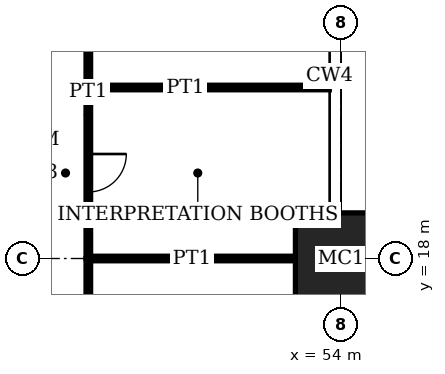
"""IFC4 building model, lengths in metres.
Left out: names, types, materials, properties, quantities, classifications, styles, units other than length and angle.
Written with IfcOpenShell. Run it as: python <this file> out.ifc"""

import sys

from ifc_helpers import new_model, si_unit, direction, frame, frame_2d, origin, origin_2d, place, context, subcontext, project, spatial, rectangle, extrude, element, fill, save


model = new_model("IFC4")
c1 = context("Model", 3, precision=1e-05, world=origin(), true_north=direction((0.0, 1.0)))
c2 = subcontext(c1, "Body", "Model", "MODEL_VIEW")
j1 = project(units=[si_unit("LENGTHUNIT", "METRE"), si_unit("PLANEANGLEUNIT", "RADIAN")], contexts=[c1])
p1 = place(None, origin())
s1 = spatial("IfcSite", under=j1, at=p1, CompositionType="ELEMENT")
p2 = place(p1, origin())
s2 = spatial("IfcBuilding", under=s1, at=p2, CompositionType="ELEMENT")
p3 = place(p2, frame((0.0, 0.0, 178.2)))
s3 = spatial("IfcBuildingStorey", under=s2, at=p3, CompositionType="ELEMENT", Elevation=178.2)
p4 = place(p3, frame((54.0, 18.0, 0.0), z_axis=(0.0, 0.0, 1.0), x_axis=(1.0, 0.0, 0.0)))
e1 = element("IfcColumn", 1, at=p4, inside=s3, PredefinedType="COLUMN", context=c2, shape_type="SweptSolid", body=[
    extrude(rectangle(XDim=2.4, YDim=2.4, at=origin_2d()), origin(), (0.0, 0.0, 1.0), 4.0),
])
p5 = place(p3, frame((47.35, 18.0, 0.0), z_axis=(0.0, 0.0, 1.0), x_axis=(1.0, 0.0, 0.0)))
e2 = element("IfcWall", 2, at=p5, inside=s3, PredefinedType="PARTITIONING", context=c2, shape_type="SweptSolid", body=[
    extrude(rectangle(XDim=5.45, YDim=0.12, at=frame_2d((2.725, 0.0))), origin(), (0.0, 0.0, 1.0), 3.05),
])
p6 = place(p3, frame((47.35, 22.5, 0.0), z_axis=(0.0, 0.0, 1.0), x_axis=(1.0, 0.0, 0.0)))
e3 = element("IfcWall", 3, at=p6, inside=s3, PredefinedType="PARTITIONING", context=c2, shape_type="SweptSolid", body=[
    extrude(rectangle(XDim=6.34, YDim=0.12, at=frame_2d((3.17, 0.0))), origin(), (0.0, 0.0, 1.0), 3.1),
])
p7 = place(p3, frame((47.35, 9.0, 0.0), z_axis=(0.0, 0.0, 1.0), x_axis=(0.0, 1.0, 0.0)))
e4 = element("IfcWall", 4, at=p7, inside=s3, PredefinedType="PARTITIONING", context=c2, shape_type="SweptSolid", body=[
    extrude(rectangle(XDim=9.0, YDim=0.12, at=frame_2d((4.5, 0.0))), origin(), (0.0, 0.0, 1.0), 3.75),
])
p8 = place(p7, frame((4.0, 0.0, 0.0)))
e5 = element("IfcOpeningElement", 5, at=p8, cuts=e4, PredefinedType="OPENING", context=c2, shape_type="SweptSolid", body=[
    extrude(rectangle(XDim=1.0, YDim=2.4, at=frame_2d((0.5, 1.2))), frame((0.0, 0.07, 0.0), z_axis=(0.0, -1.0, 0.0), x_axis=(1.0, 0.0, 0.0)), (0.0, 0.0, 1.0), 0.14),
])
p9 = place(p3, frame((47.35, 18.0, 0.0), z_axis=(0.0, 0.0, 1.0), x_axis=(0.0, 1.0, 0.0)))
e6 = element("IfcWall", 6, at=p9, inside=s3, PredefinedType="PARTITIONING", context=c2, shape_type="SweptSolid", body=[
    extrude(rectangle(XDim=4.5, YDim=0.12, at=frame_2d((2.25, 0.0))), origin(), (0.0, 0.0, 1.0), 3.75),
])
p10 = place(p9, frame((1.75, 0.0, 0.0)))
e7 = element("IfcOpeningElement", 7, at=p10, cuts=e6, PredefinedType="OPENING", context=c2, shape_type="SweptSolid", body=[
    extrude(rectangle(XDim=1.0, YDim=2.4, at=frame_2d((0.5, 1.2))), frame((0.0, 0.07, 0.0), z_axis=(0.0, -1.0, 0.0), x_axis=(1.0, 0.0, 0.0)), (0.0, 0.0, 1.0), 0.14),
])
p11 = place(p3, frame((47.35, 22.5, 0.0), z_axis=(0.0, 0.0, 1.0), x_axis=(0.0, 1.0, 0.0)))
e8 = element("IfcWall", 8, at=p11, inside=s3, PredefinedType="PARTITIONING", context=c2, shape_type="SweptSolid", body=[
    extrude(rectangle(XDim=9.0, YDim=0.12, at=frame_2d((4.5, 0.0))), origin(), (0.0, 0.0, 1.0), 3.75),
])
p12 = place(p11, frame((4.0, 0.0, 0.0)))
e9 = element("IfcOpeningElement", 9, at=p12, cuts=e8, PredefinedType="OPENING", context=c2, shape_type="SweptSolid", body=[
    extrude(rectangle(XDim=1.0, YDim=2.4, at=frame_2d((0.5, 1.2))), frame((0.0, 0.07, 0.0), z_axis=(0.0, -1.0, 0.0), x_axis=(1.0, 0.0, 0.0)), (0.0, 0.0, 1.0), 0.14),
])
p13 = place(p10, origin())
e10 = element("IfcDoor", 10, at=p13, inside=s3, OperationType="SINGLE_SWING_RIGHT", PredefinedType="DOOR", context=c2, shape_type="SweptSolid", body=[
    extrude(rectangle(XDim=1.0, YDim=2.4, at=frame_2d((0.5, 1.2))), frame((0.0, 0.025, 0.0), z_axis=(0.0, -1.0, 0.0), x_axis=(1.0, 0.0, 0.0)), (0.0, 0.0, 1.0), 0.05),
])
fill(e7, e10)
save(model, sys.argv[1])
